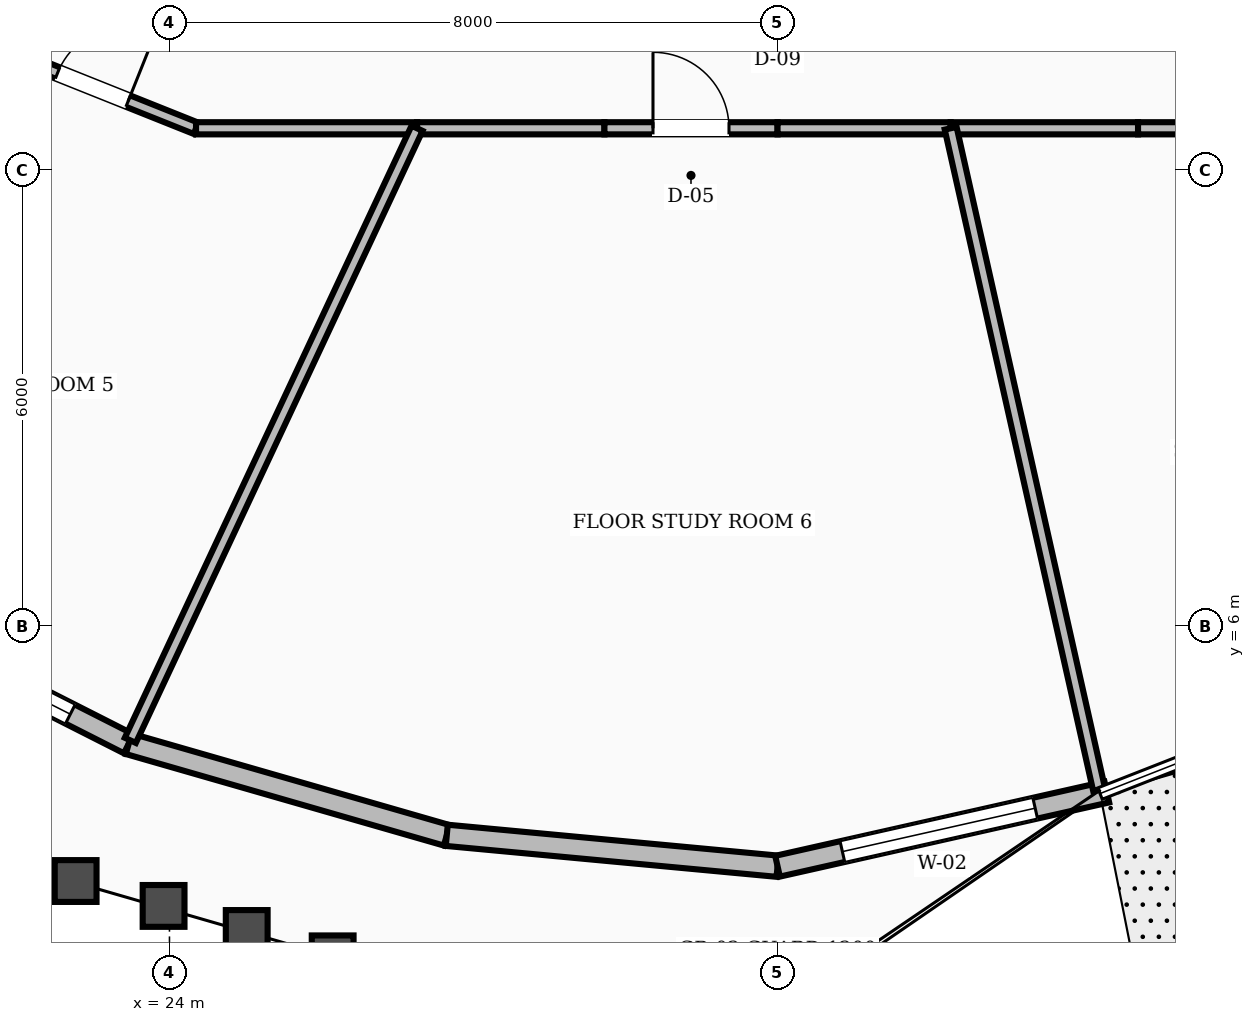
"""IFC4 building model, lengths in metres.
Left out: names, types, materials, properties, quantities, classifications, styles, units other than length and angle.
Written with IfcOpenShell. Run it as: python <this file> out.ifc"""

import sys

from ifc_helpers import new_model, si_unit, direction, frame, frame_2d, origin, place, context, subcontext, project, spatial, rectangle, extrude, element, fill, save


model = new_model("IFC4")
c1 = context("Model", 3, precision=1e-05, world=origin(), true_north=direction((0.0, 1.0)))
c2 = subcontext(c1, "Body", "Model", "MODEL_VIEW")
j1 = project(units=[si_unit("LENGTHUNIT", "METRE"), si_unit("PLANEANGLEUNIT", "RADIAN")], contexts=[c1])
p1 = place(None, origin())
s1 = spatial("IfcSite", under=j1, at=p1, CompositionType="ELEMENT")
p2 = place(p1, origin())
s2 = spatial("IfcBuilding", under=s1, at=p2, CompositionType="ELEMENT")
p3 = place(p2, frame((0.0, 0.0, 232.8)))
s3 = spatial("IfcBuildingStorey", under=s2, at=p3, CompositionType="ELEMENT", Elevation=232.8)
p4 = place(p3, frame((19.607, 6.408, 0.0), z_axis=(0.0, 0.0, 1.0), x_axis=(0.891906133231, -0.452220576162, 0.0)))
e1 = element("IfcWall", 1, at=p4, inside=s3, PredefinedType="STANDARD", context=c2, shape_type="SweptSolid", body=[
    extrude(rectangle(XDim=4.324, YDim=0.28, at=frame_2d((2.162, 0.0))), origin(), (0.0, 0.0, 1.0), 2.88),
])
p5 = place(p4, frame((0.862, 0.0, 0.8)))
e2 = element("IfcOpeningElement", 2, at=p5, cuts=e1, PredefinedType="OPENING", context=c2, shape_type="SweptSolid", body=[
    extrude(rectangle(XDim=2.6, YDim=1.65, at=frame_2d((1.3, 0.825))), frame((0.0, 0.15, 0.0), z_axis=(0.0, -1.0, 0.0), x_axis=(1.0, 0.0, 0.0)), (0.0, 0.0, 1.0), 0.3),
])
p6 = place(p3, frame((23.464, 4.452, 0.0), z_axis=(0.0, 0.0, 1.0), x_axis=(0.961001713186, -0.276542414927, 0.0)))
e3 = element("IfcWall", 3, at=p6, inside=s3, PredefinedType="STANDARD", context=c2, shape_type="SweptSolid", body=[
    extrude(rectangle(XDim=4.354, YDim=0.28, at=frame_2d((2.177, 0.0))), origin(), (0.0, 0.0, 1.0), 2.88),
])
p7 = place(p3, frame((27.648, 3.248, 0.0), z_axis=(0.0, 0.0, 1.0), x_axis=(0.995665801827, -0.093003285276, 0.0)))
e4 = element("IfcWall", 4, at=p7, inside=s3, PredefinedType="STANDARD", context=c2, shape_type="SweptSolid", body=[
    extrude(rectangle(XDim=4.371, YDim=0.28, at=frame_2d((2.186, 0.0))), origin(), (0.0, 0.0, 1.0), 2.88),
])
p8 = place(p3, frame((32.0, 2.842, 0.0), z_axis=(0.0, 0.0, 1.0), x_axis=(0.975546432827, 0.219793442572, 0.0)))
e5 = element("IfcWall", 5, at=p8, inside=s3, PredefinedType="STANDARD", context=c2, shape_type="SweptSolid", body=[
    extrude(rectangle(XDim=4.441, YDim=0.28, at=frame_2d((2.22, 0.0))), origin(), (0.0, 0.0, 1.0), 2.88),
])
p9 = place(p8, frame((0.875, 0.0, 0.8)))
e6 = element("IfcOpeningElement", 6, at=p9, cuts=e5, PredefinedType="OPENING", context=c2, shape_type="SweptSolid", body=[
    extrude(rectangle(XDim=2.6, YDim=1.65, at=frame_2d((1.3, 0.825))), frame((0.0, 0.15, 0.0), z_axis=(0.0, -1.0, 0.0), x_axis=(1.0, 0.0, 0.0)), (0.0, 0.0, 1.0), 0.3),
])
p10 = place(p3, frame((21.635, 13.635, 0.0), z_axis=(0.0, 0.0, 1.0), x_axis=(0.92856882165, -0.371160266542, 0.0)))
e7 = element("IfcWall", 7, at=p10, inside=s3, PredefinedType="SOLIDWALL", context=c2, shape_type="SweptSolid", body=[
    extrude(rectangle(XDim=2.923, YDim=0.16, at=frame_2d((1.461, 0.0))), origin(), (0.0, 0.0, 1.0), 2.87),
])
p11 = place(p10, frame((0.962, 0.0, 0.0)))
e8 = element("IfcOpeningElement", 8, at=p11, cuts=e7, PredefinedType="OPENING", context=c2, shape_type="SweptSolid", body=[
    extrude(rectangle(XDim=1.0, YDim=2.1, at=frame_2d((0.5, 1.05))), frame((0.0, 0.09, 0.0), z_axis=(0.0, -1.0, 0.0), x_axis=(1.0, 0.0, 0.0)), (0.0, 0.0, 1.0), 0.18),
])
p12 = place(p3, frame((24.349, 12.55, 0.0), z_axis=(0.0, 0.0, 1.0), x_axis=(1.0, 0.0, 0.0)))
e9 = element("IfcWall", 9, at=p12, inside=s3, PredefinedType="SOLIDWALL", context=c2, shape_type="SweptSolid", body=[
    extrude(rectangle(XDim=2.908, YDim=0.16, at=frame_2d((1.454, 0.0))), origin(), (0.0, 0.0, 1.0), 2.87),
])
p13 = place(p3, frame((27.257, 12.55, 0.0), z_axis=(0.0, 0.0, 1.0), x_axis=(1.0, 0.0, 0.0)))
e10 = element("IfcWall", 10, at=p13, inside=s3, PredefinedType="SOLIDWALL", context=c2, shape_type="SweptSolid", body=[
    extrude(rectangle(XDim=2.465, YDim=0.16, at=frame_2d((1.232, 0.0))), origin(), (0.0, 0.0, 1.0), 2.87),
])
p14 = place(p3, frame((29.722, 12.55, 0.0), z_axis=(0.0, 0.0, 1.0), x_axis=(1.0, 0.0, 0.0)))
e11 = element("IfcWall", 11, at=p14, inside=s3, PredefinedType="SOLIDWALL", context=c2, shape_type="SweptSolid", body=[
    extrude(rectangle(XDim=2.278, YDim=0.16, at=frame_2d((1.139, 0.0))), origin(), (0.0, 0.0, 1.0), 2.87),
])
p15 = place(p14, frame((0.639, 0.0, 0.0)))
e12 = element("IfcOpeningElement", 12, at=p15, cuts=e11, PredefinedType="OPENING", context=c2, shape_type="SweptSolid", body=[
    extrude(rectangle(XDim=1.0, YDim=2.1, at=frame_2d((0.5, 1.05))), frame((0.0, 0.09, 0.0), z_axis=(0.0, -1.0, 0.0), x_axis=(1.0, 0.0, 0.0)), (0.0, 0.0, 1.0), 0.18),
])
p16 = place(p3, frame((32.0, 12.55, 0.0), z_axis=(0.0, 0.0, 1.0), x_axis=(1.0, 0.0, 0.0)))
e13 = element("IfcWall", 13, at=p16, inside=s3, PredefinedType="SOLIDWALL", context=c2, shape_type="SweptSolid", body=[
    extrude(rectangle(XDim=2.278, YDim=0.16, at=frame_2d((1.139, 0.0))), origin(), (0.0, 0.0, 1.0), 2.87),
])
p17 = place(p3, frame((34.278, 12.55, 0.0), z_axis=(0.0, 0.0, 1.0), x_axis=(1.0, 0.0, 0.0)))
e14 = element("IfcWall", 14, at=p17, inside=s3, PredefinedType="SOLIDWALL", context=c2, shape_type="SweptSolid", body=[
    extrude(rectangle(XDim=2.465, YDim=0.16, at=frame_2d((1.232, 0.0))), origin(), (0.0, 0.0, 1.0), 2.87),
])
p18 = place(p3, frame((36.743, 12.55, 0.0), z_axis=(0.0, 0.0, 1.0), x_axis=(1.0, 0.0, 0.0)))
e15 = element("IfcWall", 15, at=p18, inside=s3, PredefinedType="SOLIDWALL", context=c2, shape_type="SweptSolid", body=[
    extrude(rectangle(XDim=2.908, YDim=0.16, at=frame_2d((1.454, 0.0))), origin(), (0.0, 0.0, 1.0), 2.87),
])
p19 = place(p18, frame((0.954, 0.0, 0.0)))
e16 = element("IfcOpeningElement", 16, at=p19, cuts=e15, PredefinedType="OPENING", context=c2, shape_type="SweptSolid", body=[
    extrude(rectangle(XDim=1.0, YDim=2.1, at=frame_2d((0.5, 1.05))), frame((0.0, 0.09, 0.0), z_axis=(0.0, -1.0, 0.0), x_axis=(1.0, 0.0, 0.0)), (0.0, 0.0, 1.0), 0.18),
])
p20 = place(p3, frame((27.257, 12.55, 0.0), z_axis=(0.0, 0.0, 1.0), x_axis=(-0.424224240042, -0.905557173325, 0.0)))
e17 = element("IfcWall", 17, at=p20, inside=s3, PredefinedType="SOLIDWALL", context=c2, shape_type="SweptSolid", body=[
    extrude(rectangle(XDim=8.892, YDim=0.16, at=frame_2d((4.446, 0.0))), origin(), (0.0, 0.0, 1.0), 2.87),
])
p21 = place(p3, frame((34.278, 12.55, 0.0), z_axis=(0.0, 0.0, 1.0), x_axis=(0.219036747028, -0.975716610216, 0.0)))
e18 = element("IfcWall", 18, at=p21, inside=s3, PredefinedType="SOLIDWALL", context=c2, shape_type="SweptSolid", body=[
    extrude(rectangle(XDim=8.92, YDim=0.16, at=frame_2d((4.46, 0.0))), origin(), (0.0, 0.0, 1.0), 2.87),
])
p22 = place(p5, origin())
e19 = element("IfcWindow", 19, at=p22, inside=s3, PartitioningType="SINGLE_PANEL", PredefinedType="WINDOW", context=c2, shape_type="SweptSolid", body=[
    extrude(rectangle(XDim=2.6, YDim=1.65, at=frame_2d((1.3, 0.825))), frame((0.0, 0.03, 0.0), z_axis=(0.0, -1.0, 0.0), x_axis=(1.0, 0.0, 0.0)), (0.0, 0.0, 1.0), 0.06),
])
fill(e2, e19)
p23 = place(p9, origin())
e20 = element("IfcWindow", 20, at=p23, inside=s3, PartitioningType="SINGLE_PANEL", PredefinedType="WINDOW", context=c2, shape_type="SweptSolid", body=[
    extrude(rectangle(XDim=2.6, YDim=1.65, at=frame_2d((1.3, 0.825))), frame((0.0, 0.03, 0.0), z_axis=(0.0, -1.0, 0.0), x_axis=(1.0, 0.0, 0.0)), (0.0, 0.0, 1.0), 0.06),
])
fill(e6, e20)
p24 = place(p11, origin())
e21 = element("IfcDoor", 21, at=p24, inside=s3, OperationType="SINGLE_SWING_RIGHT", PredefinedType="DOOR", context=c2, shape_type="SweptSolid", body=[
    extrude(rectangle(XDim=1.0, YDim=2.1, at=frame_2d((0.5, 1.05))), frame((0.0, 0.025, 0.0), z_axis=(0.0, -1.0, 0.0), x_axis=(1.0, 0.0, 0.0)), (0.0, 0.0, 1.0), 0.05),
])
fill(e8, e21)
p25 = place(p15, origin())
e22 = element("IfcDoor", 22, at=p25, inside=s3, OperationType="SINGLE_SWING_LEFT", PredefinedType="DOOR", context=c2, shape_type="SweptSolid", body=[
    extrude(rectangle(XDim=1.0, YDim=2.1, at=frame_2d((0.5, 1.05))), frame((0.0, 0.025, 0.0), z_axis=(0.0, -1.0, 0.0), x_axis=(1.0, 0.0, 0.0)), (0.0, 0.0, 1.0), 0.05),
])
fill(e12, e22)
save(model, sys.argv[1])
